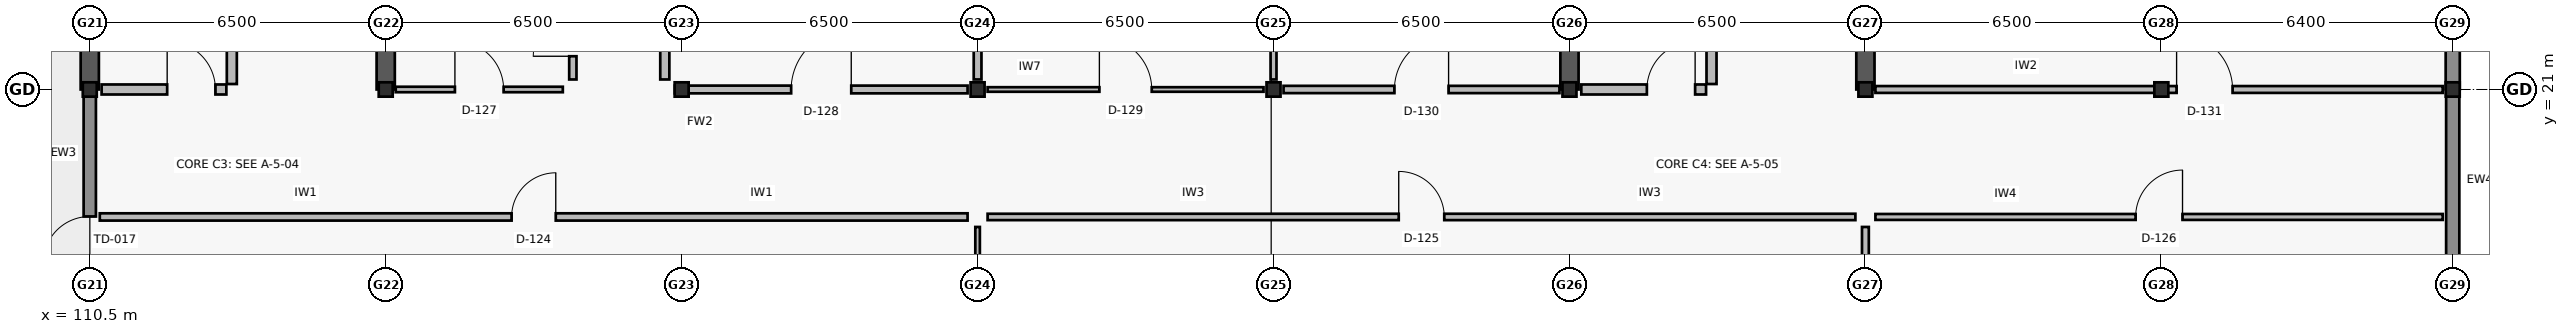
"""IFC4 building model, lengths in metres.
Left out: names, types, materials, properties, quantities, classifications, styles, units other than length and angle.
Written with IfcOpenShell. Run it as: python <this file> out.ifc"""

import sys

from ifc_helpers import new_model, si_unit, direction, frame, frame_2d, origin, origin_2d, place, context, subcontext, project, spatial, rectangle, i_section, extrude, element, fill, save


model = new_model("IFC4")
c1 = context("Model", 3, precision=1e-05, world=origin(), true_north=direction((0.0, 1.0)))
c2 = subcontext(c1, "Body", "Model", "MODEL_VIEW")
j1 = project(units=[si_unit("LENGTHUNIT", "METRE"), si_unit("PLANEANGLEUNIT", "RADIAN")], contexts=[c1])
p1 = place(None, origin())
s1 = spatial("IfcSite", under=j1, at=p1, CompositionType="ELEMENT")
p2 = place(p1, origin())
s2 = spatial("IfcBuilding", under=s1, at=p2, CompositionType="ELEMENT")
p3 = place(p2, frame((0.0, 0.0, 13.5)))
s3 = spatial("IfcBuildingStorey", under=s2, at=p3, CompositionType="ELEMENT", Elevation=13.5)
for number, where, z_axis, x_axis in (
    (1, (110.5, 21.0, 0.0), (0.0, 0.0, 1.0), (1.0, 0.0, 0.0)),
    (2, (117.0, 21.0, 0.0), (0.0, 0.0, 1.0), (1.0, 0.0, 0.0)),
    (3, (123.5, 21.0, 0.0), (0.0, 0.0, 1.0), (1.0, 0.0, 0.0)),
    (4, (130.0, 21.0, 0.0), (0.0, 0.0, 1.0), (1.0, 0.0, 0.0)),
    (5, (136.5, 21.0, 0.0), (0.0, 0.0, 1.0), (1.0, 0.0, 0.0)),
    (6, (143.0, 21.0, 0.0), (0.0, 0.0, 1.0), (1.0, 0.0, 0.0)),
    (7, (149.5, 21.0, 0.0), (0.0, 0.0, 1.0), (1.0, 0.0, 0.0)),
    (8, (156.0, 21.0, 0.0), (0.0, 0.0, 1.0), (1.0, 0.0, 0.0)),
    (9, (162.4, 21.0, 0.0), (0.0, 0.0, 1.0), (1.0, 0.0, 0.0)),
):
    element("IfcColumn", number, at=place(p3, frame(where, z_axis=z_axis, x_axis=x_axis)), inside=s3, PredefinedType="COLUMN", context=c2, shape_type="SweptSolid", body=[
        extrude(i_section(OverallWidth=0.307, OverallDepth=0.315, WebThickness=0.012, FlangeThickness=0.019, FilletRadius=0.017, at=origin_2d()), origin(), (0.0, 0.0, 1.0), 3.9),
    ])
for number, where, z_axis, x_axis in (
    (10, (110.5, 21.0, 0.0), (0.0, 0.0, 1.0), (0.0, 1.0, 0.0)),
    (11, (117.0, 21.0, 0.0), (0.0, 0.0, 1.0), (0.0, 1.0, 0.0)),
    (12, (143.0, 21.0, 0.0), (0.0, 0.0, 1.0), (0.0, 1.0, 0.0)),
    (13, (149.5, 21.0, 0.0), (0.0, 0.0, 1.0), (0.0, 1.0, 0.0)),
):
    element("IfcWall", number, at=place(p3, frame(where, z_axis=z_axis, x_axis=x_axis)), inside=s3, PredefinedType="SHEAR", context=c2, shape_type="SweptSolid", body=[
        extrude(rectangle(XDim=6.4, YDim=0.4, at=frame_2d((3.2, 0.0))), origin(), (0.0, 0.0, 1.0), 3.66),
    ])
p4 = place(p3, frame((110.5, 14.405, 0.0), z_axis=(0.0, 0.0, 1.0), x_axis=(0.0, 1.0, 0.0)))
e14 = element("IfcWall", 14, at=p4, inside=s3, PredefinedType="SOLIDWALL", context=c2, shape_type="SweptSolid", body=[
    extrude(rectangle(XDim=6.59, YDim=0.27, at=frame_2d((3.295, 0.0))), origin(), (0.0, 0.0, 1.0), 3.02),
])
p5 = place(p4, frame((2.785, 0.0, 0.0)))
e15 = element("IfcOpeningElement", 15, at=p5, cuts=e14, PredefinedType="OPENING", context=c2, shape_type="SweptSolid", body=[
    extrude(rectangle(XDim=1.02, YDim=2.14, at=frame_2d((0.51, 1.07))), frame((0.0, 0.145, 0.0), z_axis=(0.0, -1.0, 0.0), x_axis=(1.0, 0.0, 0.0)), (0.0, 0.0, 1.0), 0.29),
])
p6 = place(p3, frame((162.4, 20.995, 0.0), z_axis=(0.0, 0.0, 1.0), x_axis=(0.0, -1.0, 0.0)))
e16 = element("IfcWall", 16, at=p6, inside=s3, PredefinedType="SOLIDWALL", context=c2, shape_type="SweptSolid", body=[
    extrude(rectangle(XDim=6.59, YDim=0.29, at=frame_2d((3.295, 0.0))), origin(), (0.0, 0.0, 1.0), 3.02),
])
p7 = place(p6, frame((3.978, 0.0, 0.8)))
e17 = element("IfcOpeningElement", 17, at=p7, cuts=e16, PredefinedType="OPENING", context=c2, shape_type="SweptSolid", body=[
    extrude(rectangle(XDim=1.4, YDim=1.65, at=frame_2d((0.7, 0.825))), frame((0.0, 0.155, 0.0), z_axis=(0.0, -1.0, 0.0), x_axis=(1.0, 0.0, 0.0)), (0.0, 0.0, 1.0), 0.31),
])
p8 = place(p3, frame((162.4, 27.595, 0.0), z_axis=(0.0, 0.0, 1.0), x_axis=(0.0, -1.0, 0.0)))
e18 = element("IfcWall", 18, at=p8, inside=s3, PredefinedType="SOLIDWALL", context=c2, shape_type="SweptSolid", body=[
    extrude(rectangle(XDim=6.59, YDim=0.31, at=frame_2d((3.295, 0.0))), origin(), (0.0, 0.0, 1.0), 3.02),
])
p9 = place(p8, frame((2.52, 0.0, 0.8)))
e19 = element("IfcOpeningElement", 19, at=p9, cuts=e18, PredefinedType="OPENING", context=c2, shape_type="SweptSolid", body=[
    extrude(rectangle(XDim=1.55, YDim=1.65, at=frame_2d((0.775, 0.825))), frame((0.0, 0.165, 0.0), z_axis=(0.0, -1.0, 0.0), x_axis=(1.0, 0.0, 0.0)), (0.0, 0.0, 1.0), 0.33),
])
p10 = place(p3, frame((113.62, 21.12, 0.0), z_axis=(0.0, 0.0, 1.0), x_axis=(0.0, 1.0, 0.0)))
e20 = element("IfcWall", 20, at=p10, inside=s3, PredefinedType="SOLIDWALL", context=c2, shape_type="SweptSolid", body=[
    extrude(rectangle(XDim=6.255, YDim=0.22, at=frame_2d((3.127, 0.0))), origin(), (0.0, 0.0, 1.0), 3.66),
])
p11 = place(p3, frame((110.76, 21.0, 0.0), z_axis=(0.0, 0.0, 1.0), x_axis=(1.0, 0.0, 0.0)))
e21 = element("IfcWall", 21, at=p11, inside=s3, PredefinedType="SOLIDWALL", context=c2, shape_type="SweptSolid", body=[
    extrude(rectangle(XDim=2.74, YDim=0.22, at=frame_2d((1.37, 0.0))), origin(), (0.0, 0.0, 1.0), 3.02),
])
p12 = place(p11, frame((1.44, 0.0, 0.0)))
e22 = element("IfcOpeningElement", 22, at=p12, cuts=e21, PredefinedType="OPENING", context=c2, shape_type="SweptSolid", body=[
    extrude(rectangle(XDim=1.06, YDim=2.1, at=frame_2d((0.53, 1.05))), frame((0.0, 0.12, 0.0), z_axis=(0.0, -1.0, 0.0), x_axis=(1.0, 0.0, 0.0)), (0.0, 0.0, 1.0), 0.24),
])
p13 = place(p3, frame((146.12, 21.12, 0.0), z_axis=(0.0, 0.0, 1.0), x_axis=(0.0, 1.0, 0.0)))
e23 = element("IfcWall", 23, at=p13, inside=s3, PredefinedType="SOLIDWALL", context=c2, shape_type="SweptSolid", body=[
    extrude(rectangle(XDim=6.255, YDim=0.22, at=frame_2d((3.127, 0.0))), origin(), (0.0, 0.0, 1.0), 3.66),
])
p14 = place(p3, frame((143.26, 21.0, 0.0), z_axis=(0.0, 0.0, 1.0), x_axis=(1.0, 0.0, 0.0)))
e24 = element("IfcWall", 24, at=p14, inside=s3, PredefinedType="SOLIDWALL", context=c2, shape_type="SweptSolid", body=[
    extrude(rectangle(XDim=2.74, YDim=0.22, at=frame_2d((1.37, 0.0))), origin(), (0.0, 0.0, 1.0), 3.02),
])
p15 = place(p14, frame((1.44, 0.0, 0.0)))
e25 = element("IfcOpeningElement", 25, at=p15, cuts=e24, PredefinedType="OPENING", context=c2, shape_type="SweptSolid", body=[
    extrude(rectangle(XDim=1.06, YDim=2.1, at=frame_2d((0.53, 1.05))), frame((0.0, 0.12, 0.0), z_axis=(0.0, -1.0, 0.0), x_axis=(1.0, 0.0, 0.0)), (0.0, 0.0, 1.0), 0.24),
])
p16 = place(p3, frame((121.11, 21.22, 0.0), z_axis=(0.0, 0.0, 1.0), x_axis=(0.0, 1.0, 0.0)))
e26 = element("IfcWall", 26, at=p16, inside=s3, PredefinedType="PARTITIONING", context=c2, shape_type="SweptSolid", body=[
    extrude(rectangle(XDim=2.76, YDim=0.16, at=frame_2d((1.38, 0.0))), origin(), (0.0, 0.0, 1.0), 3.0),
])
p17 = place(p16, frame((0.51, 0.0, 0.0)))
e27 = element("IfcOpeningElement", 27, at=p17, cuts=e26, PredefinedType="OPENING", context=c2, shape_type="SweptSolid", body=[
    extrude(rectangle(XDim=1.74, YDim=2.2, at=frame_2d((0.87, 1.1))), frame((0.0, 0.09, 0.0), z_axis=(0.0, -1.0, 0.0), x_axis=(1.0, 0.0, 0.0)), (0.0, 0.0, 1.0), 0.18),
])
p18 = place(p3, frame((123.13, 21.22, 0.0), z_axis=(0.0, 0.0, 1.0), x_axis=(0.0, 1.0, 0.0)))
e28 = element("IfcWall", 28, at=p18, inside=s3, PredefinedType="PARTITIONING", context=c2, shape_type="SweptSolid", body=[
    extrude(rectangle(XDim=2.76, YDim=0.2, at=frame_2d((1.38, 0.0))), origin(), (0.0, 0.0, 1.0), 3.0),
])
p19 = place(p18, frame((0.72, 0.0, 0.0)))
e29 = element("IfcOpeningElement", 29, at=p19, cuts=e28, PredefinedType="OPENING", context=c2, shape_type="SweptSolid", body=[
    extrude(rectangle(XDim=1.32, YDim=2.12, at=frame_2d((0.66, 1.06))), frame((0.0, 0.11, 0.0), z_axis=(0.0, -1.0, 0.0), x_axis=(1.0, 0.0, 0.0)), (0.0, 0.0, 1.0), 0.22),
])
p20 = place(p3, frame((130.0, 8.02, 0.0), z_axis=(0.0, 0.0, 1.0), x_axis=(0.0, 1.0, 0.0)))
e30 = element("IfcWall", 30, at=p20, inside=s3, PredefinedType="PARTITIONING", context=c2, shape_type="SweptSolid", body=[
    extrude(rectangle(XDim=9.96, YDim=0.1, at=frame_2d((4.98, 0.0))), origin(), (0.0, 0.0, 1.0), 3.0),
])
p21 = place(p3, frame((110.72, 18.2, 0.0), z_axis=(0.0, 0.0, 1.0), x_axis=(1.0, 0.0, 0.0)))
e31 = element("IfcWall", 31, at=p21, inside=s3, PredefinedType="PARTITIONING", context=c2, shape_type="SweptSolid", body=[
    extrude(rectangle(XDim=19.06, YDim=0.16, at=frame_2d((9.53, 0.0))), origin(), (0.0, 0.0, 1.0), 3.0),
])
p22 = place(p21, frame((9.045, 0.0, 0.0)))
e32 = element("IfcOpeningElement", 32, at=p22, cuts=e31, PredefinedType="OPENING", context=c2, shape_type="SweptSolid", body=[
    extrude(rectangle(XDim=0.97, YDim=2.1, at=frame_2d((0.485, 1.05))), frame((0.0, 0.09, 0.0), z_axis=(0.0, -1.0, 0.0), x_axis=(1.0, 0.0, 0.0)), (0.0, 0.0, 1.0), 0.18),
])
p23 = place(p3, frame((149.5, 8.02, 0.0), z_axis=(0.0, 0.0, 1.0), x_axis=(0.0, 1.0, 0.0)))
e33 = element("IfcWall", 33, at=p23, inside=s3, PredefinedType="PARTITIONING", context=c2, shape_type="SweptSolid", body=[
    extrude(rectangle(XDim=9.96, YDim=0.15, at=frame_2d((4.98, 0.0))), origin(), (0.0, 0.0, 1.0), 3.0),
])
p24 = place(p3, frame((130.22, 18.2, 0.0), z_axis=(0.0, 0.0, 1.0), x_axis=(1.0, 0.0, 0.0)))
e34 = element("IfcWall", 34, at=p24, inside=s3, PredefinedType="PARTITIONING", context=c2, shape_type="SweptSolid", body=[
    extrude(rectangle(XDim=19.06, YDim=0.14, at=frame_2d((9.53, 0.0))), origin(), (0.0, 0.0, 1.0), 3.0),
])
p25 = place(p24, frame((9.03, 0.0, 0.0)))
e35 = element("IfcOpeningElement", 35, at=p25, cuts=e34, PredefinedType="OPENING", context=c2, shape_type="SweptSolid", body=[
    extrude(rectangle(XDim=1.0, YDim=2.12, at=frame_2d((0.5, 1.06))), frame((0.0, 0.08, 0.0), z_axis=(0.0, -1.0, 0.0), x_axis=(1.0, 0.0, 0.0)), (0.0, 0.0, 1.0), 0.16),
])
p26 = place(p3, frame((149.72, 18.2, 0.0), z_axis=(0.0, 0.0, 1.0), x_axis=(1.0, 0.0, 0.0)))
e36 = element("IfcWall", 36, at=p26, inside=s3, PredefinedType="PARTITIONING", context=c2, shape_type="SweptSolid", body=[
    extrude(rectangle(XDim=12.46, YDim=0.13, at=frame_2d((6.23, 0.0))), origin(), (0.0, 0.0, 1.0), 3.0),
])
p27 = place(p26, frame((5.715, 0.0, 0.0)))
e37 = element("IfcOpeningElement", 37, at=p27, cuts=e36, PredefinedType="OPENING", context=c2, shape_type="SweptSolid", body=[
    extrude(rectangle(XDim=1.03, YDim=2.06, at=frame_2d((0.515, 1.03))), frame((0.0, 0.075, 0.0), z_axis=(0.0, -1.0, 0.0), x_axis=(1.0, 0.0, 0.0)), (0.0, 0.0, 1.0), 0.15),
])
p28 = place(p3, frame((117.22, 21.0, 0.0), z_axis=(0.0, 0.0, 1.0), x_axis=(1.0, 0.0, 0.0)))
e38 = element("IfcWall", 38, at=p28, inside=s3, PredefinedType="PARTITIONING", context=c2, shape_type="SweptSolid", body=[
    extrude(rectangle(XDim=3.67, YDim=0.12, at=frame_2d((1.835, 0.0))), origin(), (0.0, 0.0, 1.0), 3.0),
])
p29 = place(p28, frame((1.3, 0.0, 0.0)))
e39 = element("IfcOpeningElement", 39, at=p29, cuts=e38, PredefinedType="OPENING", context=c2, shape_type="SweptSolid", body=[
    extrude(rectangle(XDim=1.07, YDim=2.08, at=frame_2d((0.535, 1.04))), frame((0.0, 0.07, 0.0), z_axis=(0.0, -1.0, 0.0), x_axis=(1.0, 0.0, 0.0)), (0.0, 0.0, 1.0), 0.14),
])
p30 = place(p3, frame((123.35, 21.0, 0.0), z_axis=(0.0, 0.0, 1.0), x_axis=(1.0, 0.0, 0.0)))
e40 = element("IfcWall", 40, at=p30, inside=s3, PredefinedType="PARTITIONING", context=c2, shape_type="SweptSolid", body=[
    extrude(rectangle(XDim=6.43, YDim=0.17, at=frame_2d((3.215, 0.0))), origin(), (0.0, 0.0, 1.0), 3.0),
])
p31 = place(p30, frame((2.555, 0.0, 0.0)))
e41 = element("IfcOpeningElement", 41, at=p31, cuts=e40, PredefinedType="OPENING", context=c2, shape_type="SweptSolid", body=[
    extrude(rectangle(XDim=1.32, YDim=2.12, at=frame_2d((0.66, 1.06))), frame((0.0, 0.095, 0.0), z_axis=(0.0, -1.0, 0.0), x_axis=(1.0, 0.0, 0.0)), (0.0, 0.0, 1.0), 0.19),
])
p32 = place(p3, frame((130.22, 21.0, 0.0), z_axis=(0.0, 0.0, 1.0), x_axis=(1.0, 0.0, 0.0)))
e42 = element("IfcWall", 42, at=p32, inside=s3, PredefinedType="PARTITIONING", context=c2, shape_type="SweptSolid", body=[
    extrude(rectangle(XDim=6.06, YDim=0.1, at=frame_2d((3.03, 0.0))), origin(), (0.0, 0.0, 1.0), 3.0),
])
p33 = place(p32, frame((2.455, 0.0, 0.0)))
e43 = element("IfcOpeningElement", 43, at=p33, cuts=e42, PredefinedType="OPENING", context=c2, shape_type="SweptSolid", body=[
    extrude(rectangle(XDim=1.15, YDim=2.12, at=frame_2d((0.575, 1.06))), frame((0.0, 0.06, 0.0), z_axis=(0.0, -1.0, 0.0), x_axis=(1.0, 0.0, 0.0)), (0.0, 0.0, 1.0), 0.12),
])
p34 = place(p3, frame((136.72, 21.0, 0.0), z_axis=(0.0, 0.0, 1.0), x_axis=(1.0, 0.0, 0.0)))
e44 = element("IfcWall", 44, at=p34, inside=s3, PredefinedType="PARTITIONING", context=c2, shape_type="SweptSolid", body=[
    extrude(rectangle(XDim=6.06, YDim=0.16, at=frame_2d((3.03, 0.0))), origin(), (0.0, 0.0, 1.0), 3.0),
])
p35 = place(p34, frame((2.435, 0.0, 0.0)))
e45 = element("IfcOpeningElement", 45, at=p35, cuts=e44, PredefinedType="OPENING", context=c2, shape_type="SweptSolid", body=[
    extrude(rectangle(XDim=1.19, YDim=2.14, at=frame_2d((0.595, 1.07))), frame((0.0, 0.09, 0.0), z_axis=(0.0, -1.0, 0.0), x_axis=(1.0, 0.0, 0.0)), (0.0, 0.0, 1.0), 0.18),
])
p36 = place(p3, frame((149.72, 21.0, 0.0), z_axis=(0.0, 0.0, 1.0), x_axis=(1.0, 0.0, 0.0)))
e46 = element("IfcWall", 46, at=p36, inside=s3, PredefinedType="PARTITIONING", context=c2, shape_type="SweptSolid", body=[
    extrude(rectangle(XDim=12.46, YDim=0.15, at=frame_2d((6.23, 0.0))), origin(), (0.0, 0.0, 1.0), 3.0),
])
p37 = place(p36, frame((6.615, 0.0, 0.0)))
e47 = element("IfcOpeningElement", 47, at=p37, cuts=e46, PredefinedType="OPENING", context=c2, shape_type="SweptSolid", body=[
    extrude(rectangle(XDim=1.23, YDim=2.08, at=frame_2d((0.615, 1.04))), frame((0.0, 0.085, 0.0), z_axis=(0.0, -1.0, 0.0), x_axis=(1.0, 0.0, 0.0)), (0.0, 0.0, 1.0), 0.17),
])
p38 = place(p3, frame((130.0, 21.22, 0.0), z_axis=(0.0, 0.0, 1.0), x_axis=(0.0, 1.0, 0.0)))
e48 = element("IfcWall", 48, at=p38, inside=s3, PredefinedType="PARTITIONING", context=c2, shape_type="SweptSolid", body=[
    extrude(rectangle(XDim=6.16, YDim=0.17, at=frame_2d((3.08, 0.0))), origin(), (0.0, 0.0, 1.0), 3.0),
])
p39 = place(p3, frame((136.5, 21.22, 0.0), z_axis=(0.0, 0.0, 1.0), x_axis=(0.0, 1.0, 0.0)))
e49 = element("IfcWall", 49, at=p39, inside=s3, PredefinedType="PARTITIONING", context=c2, shape_type="SweptSolid", body=[
    extrude(rectangle(XDim=6.16, YDim=0.13, at=frame_2d((3.08, 0.0))), origin(), (0.0, 0.0, 1.0), 3.0),
])
p40 = place(p5, origin())
e50 = element("IfcDoor", 50, at=p40, inside=s3, OperationType="SINGLE_SWING_LEFT", PredefinedType="DOOR", context=c2, shape_type="SweptSolid", body=[
    extrude(rectangle(XDim=1.02, YDim=2.14, at=frame_2d((0.51, 1.07))), frame((0.0, 0.025, 0.0), z_axis=(0.0, -1.0, 0.0), x_axis=(1.0, 0.0, 0.0)), (0.0, 0.0, 1.0), 0.05),
])
fill(e15, e50)
p41 = place(p12, origin())
e51 = element("IfcDoor", 51, at=p41, inside=s3, OperationType="SINGLE_SWING_LEFT", PredefinedType="DOOR", context=c2, shape_type="SweptSolid", body=[
    extrude(rectangle(XDim=1.06, YDim=2.1, at=frame_2d((0.53, 1.05))), frame((0.0, 0.025, 0.0), z_axis=(0.0, -1.0, 0.0), x_axis=(1.0, 0.0, 0.0)), (0.0, 0.0, 1.0), 0.05),
])
fill(e22, e51)
p42 = place(p15, origin())
e52 = element("IfcDoor", 52, at=p42, inside=s3, OperationType="SINGLE_SWING_RIGHT", PredefinedType="DOOR", context=c2, shape_type="SweptSolid", body=[
    extrude(rectangle(XDim=1.06, YDim=2.1, at=frame_2d((0.53, 1.05))), frame((0.0, 0.025, 0.0), z_axis=(0.0, -1.0, 0.0), x_axis=(1.0, 0.0, 0.0)), (0.0, 0.0, 1.0), 0.05),
])
fill(e25, e52)
p43 = place(p17, origin())
e53 = element("IfcDoor", 53, at=p43, inside=s3, OperationType="DOUBLE_DOOR_SINGLE_SWING", PredefinedType="DOOR", context=c2, shape_type="SweptSolid", body=[
    extrude(rectangle(XDim=1.74, YDim=2.2, at=frame_2d((0.87, 1.1))), frame((0.0, 0.025, 0.0), z_axis=(0.0, -1.0, 0.0), x_axis=(1.0, 0.0, 0.0)), (0.0, 0.0, 1.0), 0.05),
])
fill(e27, e53)
p44 = place(p22, origin())
e54 = element("IfcDoor", 54, at=p44, inside=s3, OperationType="SINGLE_SWING_RIGHT", PredefinedType="DOOR", context=c2, shape_type="SweptSolid", body=[
    extrude(rectangle(XDim=0.97, YDim=2.1, at=frame_2d((0.485, 1.05))), frame((0.0, 0.025, 0.0), z_axis=(0.0, -1.0, 0.0), x_axis=(1.0, 0.0, 0.0)), (0.0, 0.0, 1.0), 0.05),
])
fill(e32, e54)
p45 = place(p25, origin())
e55 = element("IfcDoor", 55, at=p45, inside=s3, OperationType="SINGLE_SWING_LEFT", PredefinedType="DOOR", context=c2, shape_type="SweptSolid", body=[
    extrude(rectangle(XDim=1.0, YDim=2.12, at=frame_2d((0.5, 1.06))), frame((0.0, 0.025, 0.0), z_axis=(0.0, -1.0, 0.0), x_axis=(1.0, 0.0, 0.0)), (0.0, 0.0, 1.0), 0.05),
])
fill(e35, e55)
p46 = place(p27, origin())
e56 = element("IfcDoor", 56, at=p46, inside=s3, OperationType="SINGLE_SWING_RIGHT", PredefinedType="DOOR", context=c2, shape_type="SweptSolid", body=[
    extrude(rectangle(XDim=1.03, YDim=2.06, at=frame_2d((0.515, 1.03))), frame((0.0, 0.025, 0.0), z_axis=(0.0, -1.0, 0.0), x_axis=(1.0, 0.0, 0.0)), (0.0, 0.0, 1.0), 0.05),
])
fill(e37, e56)
p47 = place(p29, origin())
e57 = element("IfcDoor", 57, at=p47, inside=s3, OperationType="SINGLE_SWING_LEFT", PredefinedType="DOOR", context=c2, shape_type="SweptSolid", body=[
    extrude(rectangle(XDim=1.07, YDim=2.08, at=frame_2d((0.535, 1.04))), frame((0.0, 0.025, 0.0), z_axis=(0.0, -1.0, 0.0), x_axis=(1.0, 0.0, 0.0)), (0.0, 0.0, 1.0), 0.05),
])
fill(e39, e57)
p48 = place(p31, origin())
e58 = element("IfcDoor", 58, at=p48, inside=s3, OperationType="SINGLE_SWING_RIGHT", PredefinedType="DOOR", context=c2, shape_type="SweptSolid", body=[
    extrude(rectangle(XDim=1.32, YDim=2.12, at=frame_2d((0.66, 1.06))), frame((0.0, 0.025, 0.0), z_axis=(0.0, -1.0, 0.0), x_axis=(1.0, 0.0, 0.0)), (0.0, 0.0, 1.0), 0.05),
])
fill(e41, e58)
p49 = place(p33, origin())
e59 = element("IfcDoor", 59, at=p49, inside=s3, OperationType="SINGLE_SWING_LEFT", PredefinedType="DOOR", context=c2, shape_type="SweptSolid", body=[
    extrude(rectangle(XDim=1.15, YDim=2.12, at=frame_2d((0.575, 1.06))), frame((0.0, 0.025, 0.0), z_axis=(0.0, -1.0, 0.0), x_axis=(1.0, 0.0, 0.0)), (0.0, 0.0, 1.0), 0.05),
])
fill(e43, e59)
p50 = place(p35, origin())
e60 = element("IfcDoor", 60, at=p50, inside=s3, OperationType="SINGLE_SWING_RIGHT", PredefinedType="DOOR", context=c2, shape_type="SweptSolid", body=[
    extrude(rectangle(XDim=1.19, YDim=2.14, at=frame_2d((0.595, 1.07))), frame((0.0, 0.025, 0.0), z_axis=(0.0, -1.0, 0.0), x_axis=(1.0, 0.0, 0.0)), (0.0, 0.0, 1.0), 0.05),
])
fill(e45, e60)
p51 = place(p37, origin())
e61 = element("IfcDoor", 61, at=p51, inside=s3, OperationType="SINGLE_SWING_LEFT", PredefinedType="DOOR", context=c2, shape_type="SweptSolid", body=[
    extrude(rectangle(XDim=1.23, YDim=2.08, at=frame_2d((0.615, 1.04))), frame((0.0, 0.025, 0.0), z_axis=(0.0, -1.0, 0.0), x_axis=(1.0, 0.0, 0.0)), (0.0, 0.0, 1.0), 0.05),
])
fill(e47, e61)
save(model, sys.argv[1])
